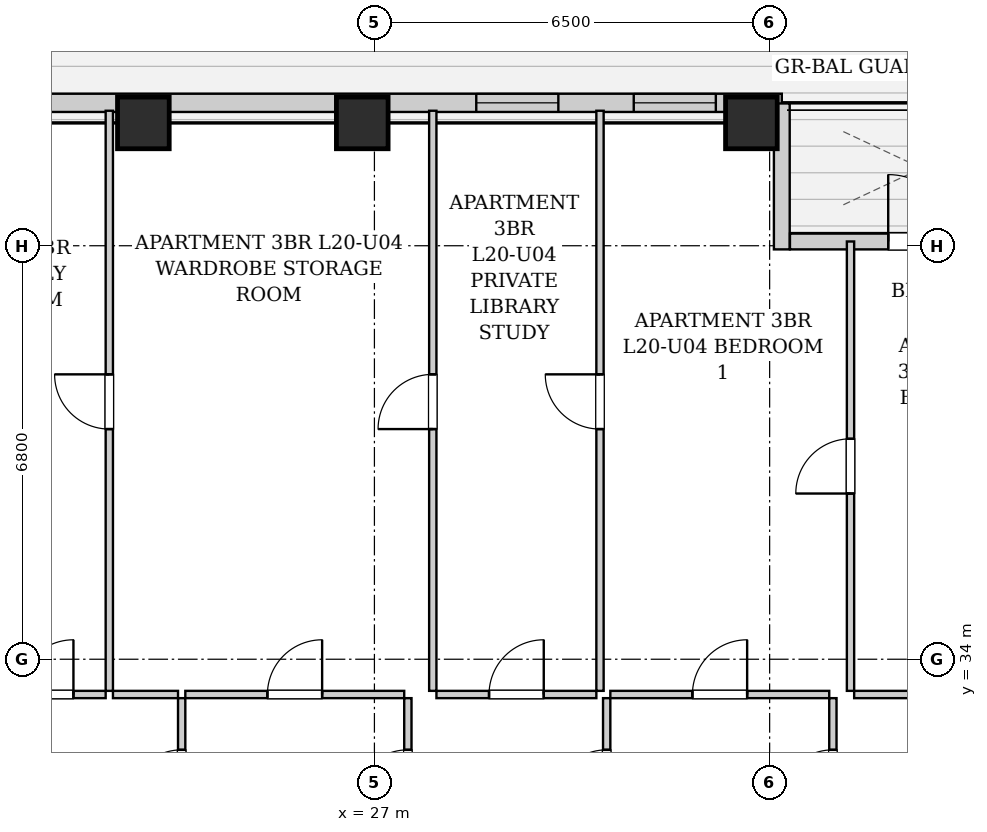
"""IFC4 building model, lengths in metres.
Left out: names, types, materials, properties, quantities, classifications, styles, units other than length and angle.
Written with IfcOpenShell. Run it as: python <this file> out.ifc"""

import sys

from ifc_helpers import new_model, si_unit, direction, frame, frame_2d, origin, origin_2d, place, context, subcontext, project, spatial, rectangle, extrude, element, fill, save


model = new_model("IFC4")
c1 = context("Model", 3, precision=1e-05, world=origin(), true_north=direction((0.0, 1.0)))
c2 = subcontext(c1, "Body", "Model", "MODEL_VIEW")
j1 = project(units=[si_unit("LENGTHUNIT", "METRE"), si_unit("PLANEANGLEUNIT", "RADIAN")], contexts=[c1])
p1 = place(None, origin())
s1 = spatial("IfcSite", under=j1, at=p1, CompositionType="ELEMENT")
p2 = place(p1, origin())
s2 = spatial("IfcBuilding", under=s1, at=p2, CompositionType="ELEMENT")
p3 = place(p2, frame((0.0, 0.0, 75.1)))
s3 = spatial("IfcBuildingStorey", under=s2, at=p3, CompositionType="ELEMENT", Elevation=75.1)
for number, where, z_axis, x_axis in (
    (1, (23.2, 42.82, 0.0), (0.0, 0.0, 1.0), (1.0, 0.0, 0.0)),
    (2, (26.8, 42.82, 0.0), (0.0, 0.0, 1.0), (1.0, 0.0, 0.0)),
    (3, (33.2, 42.82, 0.0), (0.0, 0.0, 1.0), (1.0, 0.0, 0.0)),
):
    element("IfcColumn", number, at=place(p3, frame(where, z_axis=z_axis, x_axis=x_axis)), inside=s3, PredefinedType="COLUMN", context=c2, shape_type="SweptSolid", body=[
        extrude(rectangle(XDim=0.85, YDim=0.85, at=origin_2d()), origin(), (0.0, 0.0, 1.0), 3.2),
    ])
p4 = place(p3, frame((10.0, 43.15, 0.0), z_axis=(0.0, 0.0, 1.0), x_axis=(1.0, 0.0, 0.0)))
e4 = element("IfcWall", 4, at=p4, inside=s3, PredefinedType="SOLIDWALL", context=c2, shape_type="SweptSolid", body=[
    extrude(rectangle(XDim=23.7, YDim=0.3, at=frame_2d((11.85, 0.0))), origin(), (0.0, 0.0, 1.0), 2.94),
])
p5 = place(p4, frame((1.875, 0.0, 0.0)))
e5 = element("IfcOpeningElement", 5, at=p5, cuts=e4, PredefinedType="OPENING", context=c2, shape_type="SweptSolid", body=[
    extrude(rectangle(XDim=1.5, YDim=1.982, at=frame_2d((0.75, 0.991))), frame((0.0, 0.16, 0.0), z_axis=(0.0, -1.0, 0.0), x_axis=(1.0, 0.0, 0.0)), (0.0, 0.0, 1.0), 0.32),
])
p6 = place(p4, frame((5.625, 0.0, 0.55)))
e6 = element("IfcOpeningElement", 6, at=p6, cuts=e4, PredefinedType="OPENING", context=c2, shape_type="SweptSolid", body=[
    extrude(rectangle(XDim=1.35, YDim=1.2, at=frame_2d((0.675, 0.6))), frame((0.0, 0.16, 0.0), z_axis=(0.0, -1.0, 0.0), x_axis=(1.0, 0.0, 0.0)), (0.0, 0.0, 1.0), 0.32),
])
p7 = place(p4, frame((9.9, 0.0, 0.55)))
e7 = element("IfcOpeningElement", 7, at=p7, cuts=e4, PredefinedType="OPENING", context=c2, shape_type="SweptSolid", body=[
    extrude(rectangle(XDim=1.35, YDim=1.2, at=frame_2d((0.675, 0.6))), frame((0.0, 0.16, 0.0), z_axis=(0.0, -1.0, 0.0), x_axis=(1.0, 0.0, 0.0)), (0.0, 0.0, 1.0), 0.32),
])
p8 = place(p4, frame((18.675, 0.0, 0.55)))
e8 = element("IfcOpeningElement", 8, at=p8, cuts=e4, PredefinedType="OPENING", context=c2, shape_type="SweptSolid", body=[
    extrude(rectangle(XDim=1.35, YDim=1.2, at=frame_2d((0.675, 0.6))), frame((0.0, 0.16, 0.0), z_axis=(0.0, -1.0, 0.0), x_axis=(1.0, 0.0, 0.0)), (0.0, 0.0, 1.0), 0.32),
])
p9 = place(p4, frame((21.265, 0.0, 0.55)))
e9 = element("IfcOpeningElement", 9, at=p9, cuts=e4, PredefinedType="OPENING", context=c2, shape_type="SweptSolid", body=[
    extrude(rectangle(XDim=1.35, YDim=1.2, at=frame_2d((0.675, 0.6))), frame((0.0, 0.16, 0.0), z_axis=(0.0, -1.0, 0.0), x_axis=(1.0, 0.0, 0.0)), (0.0, 0.0, 1.0), 0.32),
])
p10 = place(p3, frame((33.7, 43.14, 0.0), z_axis=(0.0, 0.0, 1.0), x_axis=(0.0, -1.0, 0.0)))
e10 = element("IfcWall", 10, at=p10, inside=s3, PredefinedType="SOLIDWALL", context=c2, shape_type="SweptSolid", body=[
    extrude(rectangle(XDim=2.4, YDim=0.26, at=frame_2d((1.2, 0.0))), origin(), (0.0, 0.0, 1.0), 2.94),
])
p11 = place(p3, frame((33.834, 40.87, 0.0), z_axis=(0.0, 0.0, 1.0), x_axis=(1.0, 0.0, 0.0)))
e11 = element("IfcWall", 11, at=p11, inside=s3, PredefinedType="SOLIDWALL", context=c2, shape_type="SweptSolid", body=[
    extrude(rectangle(XDim=4.332, YDim=0.26, at=frame_2d((2.166, 0.0))), origin(), (0.0, 0.0, 1.0), 2.94),
])
p12 = place(p11, frame((1.616, 0.0, 0.0)))
e12 = element("IfcOpeningElement", 12, at=p12, cuts=e11, PredefinedType="OPENING", context=c2, shape_type="SweptSolid", body=[
    extrude(rectangle(XDim=1.1, YDim=2.0, at=frame_2d((0.55, 1.0))), frame((0.0, 0.14, 0.0), z_axis=(0.0, -1.0, 0.0), x_axis=(1.0, 0.0, 0.0)), (0.0, 0.0, 1.0), 0.28),
])
p13 = place(p11, frame((2.876, 0.0, 0.55)))
e13 = element("IfcOpeningElement", 13, at=p13, cuts=e11, PredefinedType="OPENING", context=c2, shape_type="SweptSolid", body=[
    extrude(rectangle(XDim=0.85, YDim=1.2, at=frame_2d((0.425, 0.6))), frame((0.0, 0.14, 0.0), z_axis=(0.0, -1.0, 0.0), x_axis=(1.0, 0.0, 0.0)), (0.0, 0.0, 1.0), 0.28),
])
p14 = place(p3, frame((23.83, 30.76, 0.0), z_axis=(0.0, 0.0, 1.0), x_axis=(0.0, 1.0, 0.0)))
e14 = element("IfcWall", 14, at=p14, inside=s3, PredefinedType="PARTITIONING", context=c2, shape_type="SweptSolid", body=[
    extrude(rectangle(XDim=2.6, YDim=0.12, at=frame_2d((1.3, 0.0))), origin(), (0.0, 0.0, 1.0), 2.94),
])
p15 = place(p14, frame((0.85, 0.0, 0.0)))
e15 = element("IfcOpeningElement", 15, at=p15, cuts=e14, PredefinedType="OPENING", context=c2, shape_type="SweptSolid", body=[
    extrude(rectangle(XDim=0.9, YDim=2.05, at=frame_2d((0.45, 1.025))), frame((0.0, 0.07, 0.0), z_axis=(0.0, -1.0, 0.0), x_axis=(1.0, 0.0, 0.0)), (0.0, 0.0, 1.0), 0.14),
])
p16 = place(p3, frame((20.62, 33.42, 0.0), z_axis=(0.0, 0.0, 1.0), x_axis=(1.0, 0.0, 0.0)))
e16 = element("IfcWall", 16, at=p16, inside=s3, PredefinedType="PARTITIONING", context=c2, shape_type="SweptSolid", body=[
    extrude(rectangle(XDim=1.96, YDim=0.12, at=frame_2d((0.98, 0.0))), origin(), (0.0, 0.0, 1.0), 2.94),
])
p17 = place(p16, frame((0.53, 0.0, 0.0)))
e17 = element("IfcOpeningElement", 17, at=p17, cuts=e16, PredefinedType="OPENING", context=c2, shape_type="SweptSolid", body=[
    extrude(rectangle(XDim=0.9, YDim=2.05, at=frame_2d((0.45, 1.025))), frame((0.0, 0.07, 0.0), z_axis=(0.0, -1.0, 0.0), x_axis=(1.0, 0.0, 0.0)), (0.0, 0.0, 1.0), 0.14),
])
p18 = place(p3, frame((22.7, 33.42, 0.0), z_axis=(0.0, 0.0, 1.0), x_axis=(1.0, 0.0, 0.0)))
e18 = element("IfcWall", 18, at=p18, inside=s3, PredefinedType="PARTITIONING", context=c2, shape_type="SweptSolid", body=[
    extrude(rectangle(XDim=1.07, YDim=0.12, at=frame_2d((0.535, 0.0))), origin(), (0.0, 0.0, 1.0), 2.94),
])
p19 = place(p3, frame((27.55, 30.76, 0.0), z_axis=(0.0, 0.0, 1.0), x_axis=(0.0, 1.0, 0.0)))
e19 = element("IfcWall", 19, at=p19, inside=s3, PredefinedType="PARTITIONING", context=c2, shape_type="SweptSolid", body=[
    extrude(rectangle(XDim=2.6, YDim=0.12, at=frame_2d((1.3, 0.0))), origin(), (0.0, 0.0, 1.0), 2.94),
])
p20 = place(p19, frame((0.85, 0.0, 0.0)))
e20 = element("IfcOpeningElement", 20, at=p20, cuts=e19, PredefinedType="OPENING", context=c2, shape_type="SweptSolid", body=[
    extrude(rectangle(XDim=0.9, YDim=2.05, at=frame_2d((0.45, 1.025))), frame((0.0, 0.07, 0.0), z_axis=(0.0, -1.0, 0.0), x_axis=(1.0, 0.0, 0.0)), (0.0, 0.0, 1.0), 0.14),
])
p21 = place(p3, frame((23.89, 33.42, 0.0), z_axis=(0.0, 0.0, 1.0), x_axis=(1.0, 0.0, 0.0)))
e21 = element("IfcWall", 21, at=p21, inside=s3, PredefinedType="PARTITIONING", context=c2, shape_type="SweptSolid", body=[
    extrude(rectangle(XDim=3.6, YDim=0.12, at=frame_2d((1.8, 0.0))), origin(), (0.0, 0.0, 1.0), 2.94),
])
p22 = place(p21, frame((1.35, 0.0, 0.0)))
e22 = element("IfcOpeningElement", 22, at=p22, cuts=e21, PredefinedType="OPENING", context=c2, shape_type="SweptSolid", body=[
    extrude(rectangle(XDim=0.9, YDim=2.05, at=frame_2d((0.45, 1.025))), frame((0.0, 0.07, 0.0), z_axis=(0.0, -1.0, 0.0), x_axis=(1.0, 0.0, 0.0)), (0.0, 0.0, 1.0), 0.14),
])
p23 = place(p3, frame((30.82, 30.76, 0.0), z_axis=(0.0, 0.0, 1.0), x_axis=(0.0, 1.0, 0.0)))
e23 = element("IfcWall", 23, at=p23, inside=s3, PredefinedType="PARTITIONING", context=c2, shape_type="SweptSolid", body=[
    extrude(rectangle(XDim=2.6, YDim=0.12, at=frame_2d((1.3, 0.0))), origin(), (0.0, 0.0, 1.0), 2.94),
])
p24 = place(p23, frame((0.85, 0.0, 0.0)))
e24 = element("IfcOpeningElement", 24, at=p24, cuts=e23, PredefinedType="OPENING", context=c2, shape_type="SweptSolid", body=[
    extrude(rectangle(XDim=0.9, YDim=2.05, at=frame_2d((0.45, 1.025))), frame((0.0, 0.07, 0.0), z_axis=(0.0, -1.0, 0.0), x_axis=(1.0, 0.0, 0.0)), (0.0, 0.0, 1.0), 0.14),
])
p25 = place(p3, frame((28.02, 33.42, 0.0), z_axis=(0.0, 0.0, 1.0), x_axis=(1.0, 0.0, 0.0)))
e25 = element("IfcWall", 25, at=p25, inside=s3, PredefinedType="PARTITIONING", context=c2, shape_type="SweptSolid", body=[
    extrude(rectangle(XDim=2.63, YDim=0.12, at=frame_2d((1.315, 0.0))), origin(), (0.0, 0.0, 1.0), 2.94),
])
p26 = place(p25, frame((0.865, 0.0, 0.0)))
e26 = element("IfcOpeningElement", 26, at=p26, cuts=e25, PredefinedType="OPENING", context=c2, shape_type="SweptSolid", body=[
    extrude(rectangle(XDim=0.9, YDim=2.05, at=frame_2d((0.45, 1.025))), frame((0.0, 0.07, 0.0), z_axis=(0.0, -1.0, 0.0), x_axis=(1.0, 0.0, 0.0)), (0.0, 0.0, 1.0), 0.14),
])
p27 = place(p3, frame((34.54, 30.76, 0.0), z_axis=(0.0, 0.0, 1.0), x_axis=(0.0, 1.0, 0.0)))
e27 = element("IfcWall", 27, at=p27, inside=s3, PredefinedType="PARTITIONING", context=c2, shape_type="SweptSolid", body=[
    extrude(rectangle(XDim=2.6, YDim=0.12, at=frame_2d((1.3, 0.0))), origin(), (0.0, 0.0, 1.0), 2.94),
])
p28 = place(p27, frame((0.85, 0.0, 0.0)))
e28 = element("IfcOpeningElement", 28, at=p28, cuts=e27, PredefinedType="OPENING", context=c2, shape_type="SweptSolid", body=[
    extrude(rectangle(XDim=0.9, YDim=2.05, at=frame_2d((0.45, 1.025))), frame((0.0, 0.07, 0.0), z_axis=(0.0, -1.0, 0.0), x_axis=(1.0, 0.0, 0.0)), (0.0, 0.0, 1.0), 0.14),
])
p29 = place(p3, frame((30.88, 33.42, 0.0), z_axis=(0.0, 0.0, 1.0), x_axis=(1.0, 0.0, 0.0)))
e29 = element("IfcWall", 29, at=p29, inside=s3, PredefinedType="PARTITIONING", context=c2, shape_type="SweptSolid", body=[
    extrude(rectangle(XDim=3.6, YDim=0.12, at=frame_2d((1.8, 0.0))), origin(), (0.0, 0.0, 1.0), 2.94),
])
p30 = place(p29, frame((1.35, 0.0, 0.0)))
e30 = element("IfcOpeningElement", 30, at=p30, cuts=e29, PredefinedType="OPENING", context=c2, shape_type="SweptSolid", body=[
    extrude(rectangle(XDim=0.9, YDim=2.05, at=frame_2d((0.45, 1.025))), frame((0.0, 0.07, 0.0), z_axis=(0.0, -1.0, 0.0), x_axis=(1.0, 0.0, 0.0)), (0.0, 0.0, 1.0), 0.14),
])
p31 = place(p3, frame((34.89, 33.42, 0.0), z_axis=(0.0, 0.0, 1.0), x_axis=(1.0, 0.0, 0.0)))
e31 = element("IfcWall", 31, at=p31, inside=s3, PredefinedType="PARTITIONING", context=c2, shape_type="SweptSolid", body=[
    extrude(rectangle(XDim=2.86, YDim=0.12, at=frame_2d((1.43, 0.0))), origin(), (0.0, 0.0, 1.0), 2.94),
])
p32 = place(p31, frame((0.98, 0.0, 0.0)))
e32 = element("IfcOpeningElement", 32, at=p32, cuts=e31, PredefinedType="OPENING", context=c2, shape_type="SweptSolid", body=[
    extrude(rectangle(XDim=0.9, YDim=2.05, at=frame_2d((0.45, 1.025))), frame((0.0, 0.07, 0.0), z_axis=(0.0, -1.0, 0.0), x_axis=(1.0, 0.0, 0.0)), (0.0, 0.0, 1.0), 0.14),
])
p33 = place(p3, frame((22.64, 33.48, 0.0), z_axis=(0.0, 0.0, 1.0), x_axis=(0.0, 1.0, 0.0)))
e33 = element("IfcWall", 33, at=p33, inside=s3, PredefinedType="PARTITIONING", context=c2, shape_type="SweptSolid", body=[
    extrude(rectangle(XDim=9.54, YDim=0.12, at=frame_2d((4.77, 0.0))), origin(), (0.0, 0.0, 1.0), 2.94),
])
p34 = place(p33, frame((4.305, 0.0, 0.0)))
e34 = element("IfcOpeningElement", 34, at=p34, cuts=e33, PredefinedType="OPENING", context=c2, shape_type="SweptSolid", body=[
    extrude(rectangle(XDim=0.9, YDim=2.05, at=frame_2d((0.45, 1.025))), frame((0.0, 0.07, 0.0), z_axis=(0.0, -1.0, 0.0), x_axis=(1.0, 0.0, 0.0)), (0.0, 0.0, 1.0), 0.14),
])
p35 = place(p3, frame((27.96, 33.48, 0.0), z_axis=(0.0, 0.0, 1.0), x_axis=(0.0, 1.0, 0.0)))
e35 = element("IfcWall", 35, at=p35, inside=s3, PredefinedType="PARTITIONING", context=c2, shape_type="SweptSolid", body=[
    extrude(rectangle(XDim=9.54, YDim=0.12, at=frame_2d((4.77, 0.0))), origin(), (0.0, 0.0, 1.0), 2.94),
])
p36 = place(p35, frame((4.305, 0.0, 0.0)))
e36 = element("IfcOpeningElement", 36, at=p36, cuts=e35, PredefinedType="OPENING", context=c2, shape_type="SweptSolid", body=[
    extrude(rectangle(XDim=0.9, YDim=2.05, at=frame_2d((0.45, 1.025))), frame((0.0, 0.07, 0.0), z_axis=(0.0, -1.0, 0.0), x_axis=(1.0, 0.0, 0.0)), (0.0, 0.0, 1.0), 0.14),
])
p37 = place(p3, frame((30.71, 33.48, 0.0), z_axis=(0.0, 0.0, 1.0), x_axis=(0.0, 1.0, 0.0)))
e37 = element("IfcWall", 37, at=p37, inside=s3, PredefinedType="PARTITIONING", context=c2, shape_type="SweptSolid", body=[
    extrude(rectangle(XDim=9.54, YDim=0.12, at=frame_2d((4.77, 0.0))), origin(), (0.0, 0.0, 1.0), 2.94),
])
p38 = place(p37, frame((4.305, 0.0, 0.0)))
e38 = element("IfcOpeningElement", 38, at=p38, cuts=e37, PredefinedType="OPENING", context=c2, shape_type="SweptSolid", body=[
    extrude(rectangle(XDim=0.9, YDim=2.05, at=frame_2d((0.45, 1.025))), frame((0.0, 0.07, 0.0), z_axis=(0.0, -1.0, 0.0), x_axis=(1.0, 0.0, 0.0)), (0.0, 0.0, 1.0), 0.14),
])
p39 = place(p3, frame((34.83, 33.48, 0.0), z_axis=(0.0, 0.0, 1.0), x_axis=(0.0, 1.0, 0.0)))
e39 = element("IfcWall", 39, at=p39, inside=s3, PredefinedType="PARTITIONING", context=c2, shape_type="SweptSolid", body=[
    extrude(rectangle(XDim=7.39, YDim=0.12, at=frame_2d((3.695, 0.0))), origin(), (0.0, 0.0, 1.0), 2.94),
])
p40 = place(p39, frame((3.245, 0.0, 0.0)))
e40 = element("IfcOpeningElement", 40, at=p40, cuts=e39, PredefinedType="OPENING", context=c2, shape_type="SweptSolid", body=[
    extrude(rectangle(XDim=0.9, YDim=2.05, at=frame_2d((0.45, 1.025))), frame((0.0, 0.07, 0.0), z_axis=(0.0, -1.0, 0.0), x_axis=(1.0, 0.0, 0.0)), (0.0, 0.0, 1.0), 0.14),
])
p41 = place(p15, origin())
e41 = element("IfcDoor", 41, at=p41, inside=s3, OperationType="SINGLE_SWING_LEFT", PredefinedType="DOOR", context=c2, shape_type="SweptSolid", body=[
    extrude(rectangle(XDim=0.9, YDim=2.05, at=frame_2d((0.45, 1.025))), frame((0.0, 0.025, 0.0), z_axis=(0.0, -1.0, 0.0), x_axis=(1.0, 0.0, 0.0)), (0.0, 0.0, 1.0), 0.05),
])
fill(e15, e41)
p42 = place(p17, origin())
e42 = element("IfcDoor", 42, at=p42, inside=s3, OperationType="SINGLE_SWING_RIGHT", PredefinedType="DOOR", context=c2, shape_type="SweptSolid", body=[
    extrude(rectangle(XDim=0.9, YDim=2.05, at=frame_2d((0.45, 1.025))), frame((0.0, 0.025, 0.0), z_axis=(0.0, -1.0, 0.0), x_axis=(1.0, 0.0, 0.0)), (0.0, 0.0, 1.0), 0.05),
])
fill(e17, e42)
p43 = place(p20, origin())
e43 = element("IfcDoor", 43, at=p43, inside=s3, OperationType="SINGLE_SWING_LEFT", PredefinedType="DOOR", context=c2, shape_type="SweptSolid", body=[
    extrude(rectangle(XDim=0.9, YDim=2.05, at=frame_2d((0.45, 1.025))), frame((0.0, 0.025, 0.0), z_axis=(0.0, -1.0, 0.0), x_axis=(1.0, 0.0, 0.0)), (0.0, 0.0, 1.0), 0.05),
])
fill(e20, e43)
p44 = place(p22, origin())
e44 = element("IfcDoor", 44, at=p44, inside=s3, OperationType="SINGLE_SWING_RIGHT", PredefinedType="DOOR", context=c2, shape_type="SweptSolid", body=[
    extrude(rectangle(XDim=0.9, YDim=2.05, at=frame_2d((0.45, 1.025))), frame((0.0, 0.025, 0.0), z_axis=(0.0, -1.0, 0.0), x_axis=(1.0, 0.0, 0.0)), (0.0, 0.0, 1.0), 0.05),
])
fill(e22, e44)
p45 = place(p24, origin())
e45 = element("IfcDoor", 45, at=p45, inside=s3, OperationType="SINGLE_SWING_LEFT", PredefinedType="DOOR", context=c2, shape_type="SweptSolid", body=[
    extrude(rectangle(XDim=0.9, YDim=2.05, at=frame_2d((0.45, 1.025))), frame((0.0, 0.025, 0.0), z_axis=(0.0, -1.0, 0.0), x_axis=(1.0, 0.0, 0.0)), (0.0, 0.0, 1.0), 0.05),
])
fill(e24, e45)
p46 = place(p26, origin())
e46 = element("IfcDoor", 46, at=p46, inside=s3, OperationType="SINGLE_SWING_RIGHT", PredefinedType="DOOR", context=c2, shape_type="SweptSolid", body=[
    extrude(rectangle(XDim=0.9, YDim=2.05, at=frame_2d((0.45, 1.025))), frame((0.0, 0.025, 0.0), z_axis=(0.0, -1.0, 0.0), x_axis=(1.0, 0.0, 0.0)), (0.0, 0.0, 1.0), 0.05),
])
fill(e26, e46)
p47 = place(p28, origin())
e47 = element("IfcDoor", 47, at=p47, inside=s3, OperationType="SINGLE_SWING_LEFT", PredefinedType="DOOR", context=c2, shape_type="SweptSolid", body=[
    extrude(rectangle(XDim=0.9, YDim=2.05, at=frame_2d((0.45, 1.025))), frame((0.0, 0.025, 0.0), z_axis=(0.0, -1.0, 0.0), x_axis=(1.0, 0.0, 0.0)), (0.0, 0.0, 1.0), 0.05),
])
fill(e28, e47)
p48 = place(p30, origin())
e48 = element("IfcDoor", 48, at=p48, inside=s3, OperationType="SINGLE_SWING_RIGHT", PredefinedType="DOOR", context=c2, shape_type="SweptSolid", body=[
    extrude(rectangle(XDim=0.9, YDim=2.05, at=frame_2d((0.45, 1.025))), frame((0.0, 0.025, 0.0), z_axis=(0.0, -1.0, 0.0), x_axis=(1.0, 0.0, 0.0)), (0.0, 0.0, 1.0), 0.05),
])
fill(e30, e48)
p49 = place(p34, origin())
e49 = element("IfcDoor", 49, at=p49, inside=s3, OperationType="SINGLE_SWING_RIGHT", PredefinedType="DOOR", context=c2, shape_type="SweptSolid", body=[
    extrude(rectangle(XDim=0.9, YDim=2.05, at=frame_2d((0.45, 1.025))), frame((0.0, 0.025, 0.0), z_axis=(0.0, -1.0, 0.0), x_axis=(1.0, 0.0, 0.0)), (0.0, 0.0, 1.0), 0.05),
])
fill(e34, e49)
p50 = place(p36, origin())
e50 = element("IfcDoor", 50, at=p50, inside=s3, OperationType="SINGLE_SWING_LEFT", PredefinedType="DOOR", context=c2, shape_type="SweptSolid", body=[
    extrude(rectangle(XDim=0.9, YDim=2.05, at=frame_2d((0.45, 1.025))), frame((0.0, 0.025, 0.0), z_axis=(0.0, -1.0, 0.0), x_axis=(1.0, 0.0, 0.0)), (0.0, 0.0, 1.0), 0.05),
])
fill(e36, e50)
p51 = place(p38, origin())
e51 = element("IfcDoor", 51, at=p51, inside=s3, OperationType="SINGLE_SWING_RIGHT", PredefinedType="DOOR", context=c2, shape_type="SweptSolid", body=[
    extrude(rectangle(XDim=0.9, YDim=2.05, at=frame_2d((0.45, 1.025))), frame((0.0, 0.025, 0.0), z_axis=(0.0, -1.0, 0.0), x_axis=(1.0, 0.0, 0.0)), (0.0, 0.0, 1.0), 0.05),
])
fill(e38, e51)
p52 = place(p40, origin())
e52 = element("IfcDoor", 52, at=p52, inside=s3, OperationType="SINGLE_SWING_LEFT", PredefinedType="DOOR", context=c2, shape_type="SweptSolid", body=[
    extrude(rectangle(XDim=0.9, YDim=2.05, at=frame_2d((0.45, 1.025))), frame((0.0, 0.025, 0.0), z_axis=(0.0, -1.0, 0.0), x_axis=(1.0, 0.0, 0.0)), (0.0, 0.0, 1.0), 0.05),
])
fill(e40, e52)
p53 = place(p12, origin())
e53 = element("IfcDoor", 53, at=p53, inside=s3, OperationType="SINGLE_SWING_LEFT", PredefinedType="DOOR", context=c2, shape_type="SweptSolid", body=[
    extrude(rectangle(XDim=1.1, YDim=2.0, at=frame_2d((0.55, 1.0))), frame((0.0, 0.025, 0.0), z_axis=(0.0, -1.0, 0.0), x_axis=(1.0, 0.0, 0.0)), (0.0, 0.0, 1.0), 0.05),
])
fill(e12, e53)
p54 = place(p8, origin())
e54 = element("IfcWindow", 54, at=p54, inside=s3, PartitioningType="SINGLE_PANEL", PredefinedType="WINDOW", context=c2, shape_type="SweptSolid", body=[
    extrude(rectangle(XDim=1.35, YDim=1.2, at=frame_2d((0.675, 0.6))), frame((0.0, 0.03, 0.0), z_axis=(0.0, -1.0, 0.0), x_axis=(1.0, 0.0, 0.0)), (0.0, 0.0, 1.0), 0.06),
])
fill(e8, e54)
p55 = place(p9, origin())
e55 = element("IfcWindow", 55, at=p55, inside=s3, PartitioningType="SINGLE_PANEL", PredefinedType="WINDOW", context=c2, shape_type="SweptSolid", body=[
    extrude(rectangle(XDim=1.35, YDim=1.2, at=frame_2d((0.675, 0.6))), frame((0.0, 0.03, 0.0), z_axis=(0.0, -1.0, 0.0), x_axis=(1.0, 0.0, 0.0)), (0.0, 0.0, 1.0), 0.06),
])
fill(e9, e55)
save(model, sys.argv[1])
